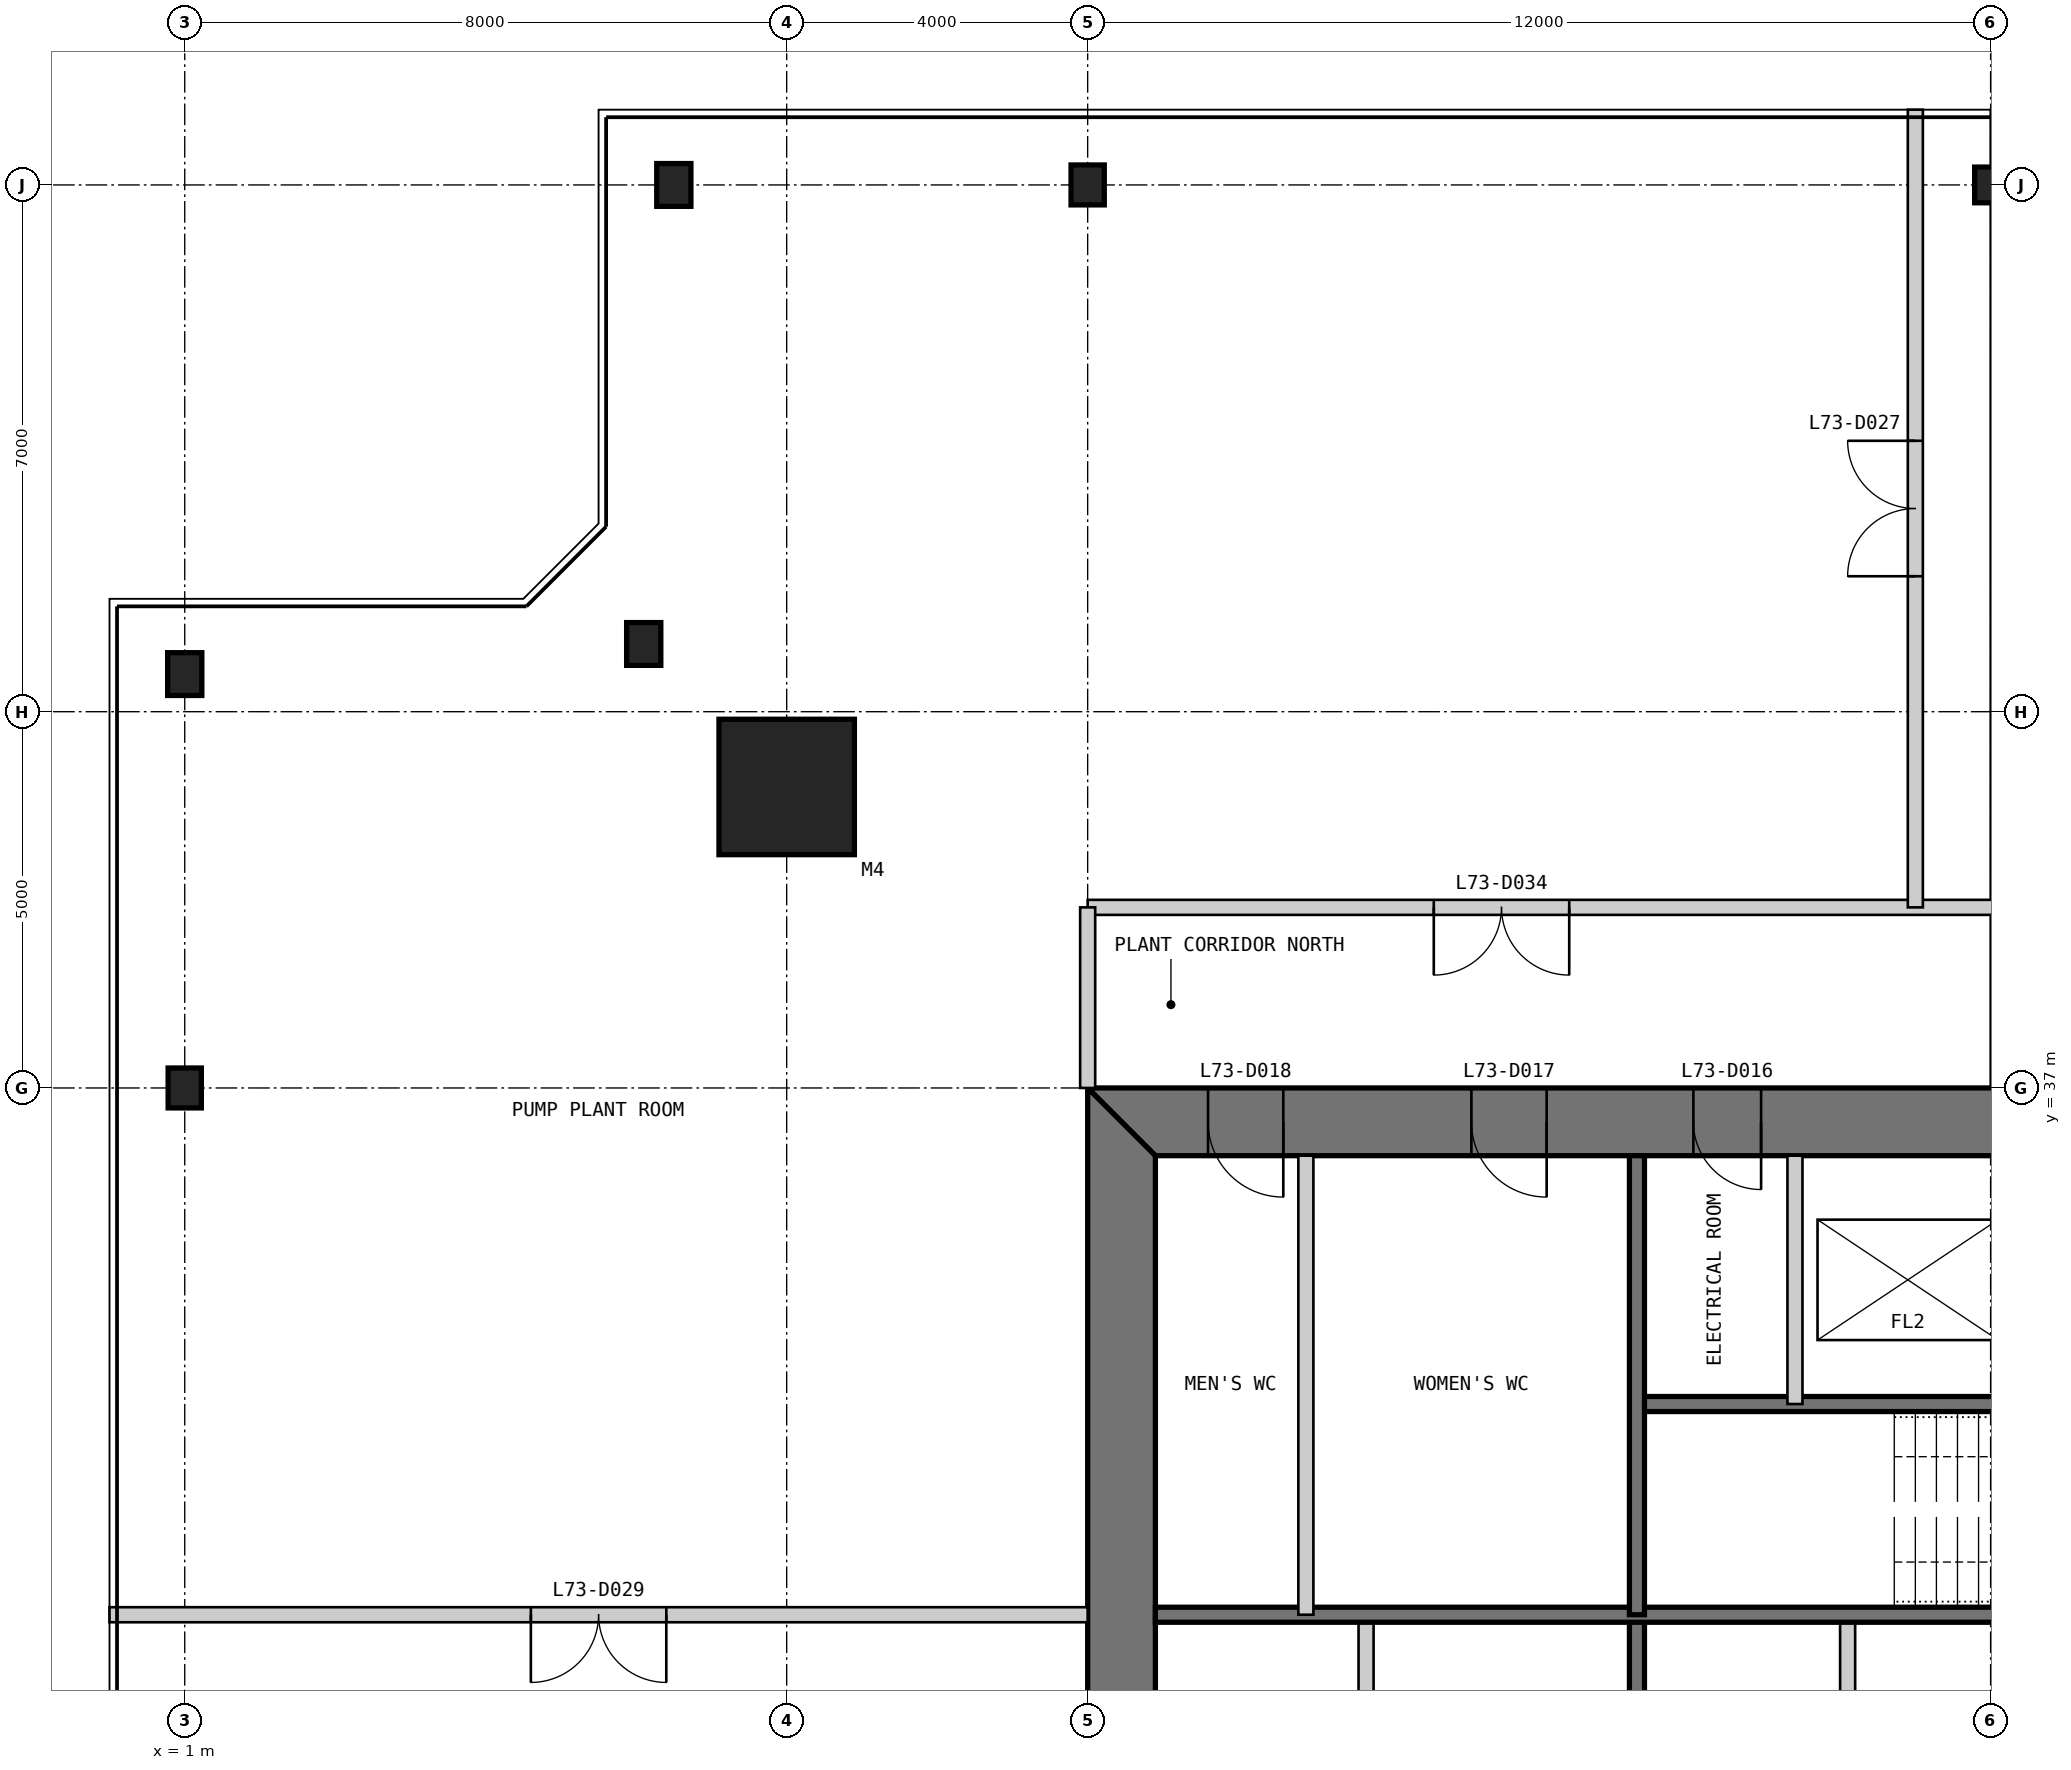
"""IFC4 building model, lengths in metres.
Left out: names, types, materials, properties, quantities, classifications, styles, units other than length and angle.
Written with IfcOpenShell. Run it as: python <this file> out.ifc"""

import sys

from ifc_helpers import new_model, si_unit, direction, frame, frame_2d, origin, origin_2d, place, context, subcontext, project, spatial, polyline, rectangle, i_section, outline, extrude, element, fill, save


model = new_model("IFC4")
c1 = context("Model", 3, precision=1e-05, world=origin(), true_north=direction((0.0, 1.0)))
c2 = subcontext(c1, "Body", "Model", "MODEL_VIEW")
j1 = project(units=[si_unit("LENGTHUNIT", "METRE"), si_unit("PLANEANGLEUNIT", "RADIAN")], contexts=[c1])
p1 = place(None, origin())
s1 = spatial("IfcSite", under=j1, at=p1, CompositionType="ELEMENT")
p2 = place(p1, origin())
s2 = spatial("IfcBuilding", under=s1, at=p2, CompositionType="ELEMENT")
p3 = place(p2, frame((0.0, 0.0, 301.8)))
s3 = spatial("IfcBuildingStorey", under=s2, at=p3, CompositionType="ELEMENT", Elevation=301.8)
p4 = place(p3, frame((9.0, 41.0, 0.0), z_axis=(0.0, 0.0, 1.0), x_axis=(1.0, 0.0, 0.0)))
e1 = element("IfcColumn", 1, at=p4, inside=s3, PredefinedType="COLUMN", context=c2, shape_type="SweptSolid", body=[
    extrude(rectangle(XDim=1.8, YDim=1.8, at=origin_2d()), origin(), (0.0, 0.0, 1.0), 6.0),
])
p5 = place(p3, frame((25.0, 49.0, 0.0), z_axis=(0.0, 0.0, 1.0), x_axis=(1.0, 0.0, 0.0)))
e2 = element("IfcColumn", 2, at=p5, inside=s3, PredefinedType="COLUMN", context=c2, shape_type="SweptSolid", body=[
    extrude(i_section(OverallWidth=0.424, OverallDepth=0.475, WebThickness=0.048, FlangeThickness=0.077, at=origin_2d()), origin(), (0.0, 0.0, 1.0), 6.0),
])
p6 = place(p3, frame((13.0, 49.0, 0.0), z_axis=(0.0, 0.0, 1.0), x_axis=(1.0, 0.0, 0.0)))
e3 = element("IfcColumn", 3, at=p6, inside=s3, PredefinedType="COLUMN", context=c2, shape_type="SweptSolid", body=[
    extrude(i_section(OverallWidth=0.442, OverallDepth=0.531, WebThickness=0.066, FlangeThickness=0.106, at=origin_2d()), origin(), (0.0, 0.0, 1.0), 6.0),
])
for number, where, z_axis, x_axis in (
    (4, (7.5, 49.0, 0.0), (0.0, 0.0, 1.0), (1.0, 0.0, 0.0)),
    (5, (7.1, 42.9, 0.0), (0.0, 0.0, 1.0), (1.0, 0.0, 0.0)),
    (6, (1.0, 42.5, 0.0), (0.0, 0.0, 1.0), (1.0, 0.0, 0.0)),
):
    element("IfcColumn", number, at=place(p3, frame(where, z_axis=z_axis, x_axis=x_axis)), inside=s3, PredefinedType="COLUMN", context=c2, shape_type="SweptSolid", body=[
        extrude(i_section(OverallWidth=0.455, OverallDepth=0.569, WebThickness=0.078, FlangeThickness=0.125, at=origin_2d()), origin(), (0.0, 0.0, 1.0), 6.0),
    ])
p7 = place(p3, frame((1.0, 37.0, 0.0), z_axis=(0.0, 0.0, 1.0), x_axis=(1.0, 0.0, 0.0)))
e7 = element("IfcColumn", 7, at=p7, inside=s3, PredefinedType="COLUMN", context=c2, shape_type="SweptSolid", body=[
    extrude(i_section(OverallWidth=0.442, OverallDepth=0.531, WebThickness=0.066, FlangeThickness=0.106, at=origin_2d()), origin(), (0.0, 0.0, 1.0), 6.0),
])
p8 = place(p3, frame((37.0, 36.55, 0.0), z_axis=(0.0, 0.0, 1.0), x_axis=(-1.0, 0.0, 0.0)))
e8 = element("IfcWall", 8, at=p8, inside=s3, PredefinedType="SHEAR", context=c2, shape_type="SweptSolid", body=[
    extrude(outline(polyline([(0.0, -0.45), (24.0, -0.45), (23.1, 0.45), (0.9, 0.45), (0.0, -0.45)])), origin(), (0.0, 0.0, 1.0), 6.0),
])
p9 = place(p8, frame((4.9, 0.0, 0.0)))
e9 = element("IfcOpeningElement", 9, at=p9, cuts=e8, PredefinedType="OPENING", context=c2, shape_type="SweptSolid", body=[
    extrude(rectangle(XDim=1.0, YDim=2.2, at=frame_2d((0.5, 1.1))), frame((0.0, 0.46, 0.0), z_axis=(0.0, -1.0, 0.0), x_axis=(1.0, 0.0, 0.0)), (0.0, 0.0, 1.0), 0.92),
])
p10 = place(p8, frame((8.9, 0.0, 0.0)))
e10 = element("IfcOpeningElement", 10, at=p10, cuts=e8, PredefinedType="OPENING", context=c2, shape_type="SweptSolid", body=[
    extrude(rectangle(XDim=1.1, YDim=2.2, at=frame_2d((0.55, 1.1))), frame((0.0, 0.46, 0.0), z_axis=(0.0, -1.0, 0.0), x_axis=(1.0, 0.0, 0.0)), (0.0, 0.0, 1.0), 0.92),
])
p11 = place(p8, frame((15.05, 0.0, 0.0)))
e11 = element("IfcOpeningElement", 11, at=p11, cuts=e8, PredefinedType="OPENING", context=c2, shape_type="SweptSolid", body=[
    extrude(rectangle(XDim=0.9, YDim=2.2, at=frame_2d((0.45, 1.1))), frame((0.0, 0.46, 0.0), z_axis=(0.0, -1.0, 0.0), x_axis=(1.0, 0.0, 0.0)), (0.0, 0.0, 1.0), 0.92),
])
p12 = place(p8, frame((17.9, 0.0, 0.0)))
e12 = element("IfcOpeningElement", 12, at=p12, cuts=e8, PredefinedType="OPENING", context=c2, shape_type="SweptSolid", body=[
    extrude(rectangle(XDim=1.0, YDim=2.2, at=frame_2d((0.5, 1.1))), frame((0.0, 0.46, 0.0), z_axis=(0.0, -1.0, 0.0), x_axis=(1.0, 0.0, 0.0)), (0.0, 0.0, 1.0), 0.92),
])
p13 = place(p8, frame((21.4, 0.0, 0.0)))
e13 = element("IfcOpeningElement", 13, at=p13, cuts=e8, PredefinedType="OPENING", context=c2, shape_type="SweptSolid", body=[
    extrude(rectangle(XDim=1.0, YDim=2.2, at=frame_2d((0.5, 1.1))), frame((0.0, 0.46, 0.0), z_axis=(0.0, -1.0, 0.0), x_axis=(1.0, 0.0, 0.0)), (0.0, 0.0, 1.0), 0.92),
])
p14 = place(p3, frame((13.45, 36.1, 0.0), z_axis=(0.0, 0.0, 1.0), x_axis=(0.0, -1.0, 0.0)))
e14 = element("IfcWall", 14, at=p14, inside=s3, PredefinedType="SHEAR", context=c2, shape_type="SweptSolid", body=[
    extrude(outline(polyline([(-0.9, -0.45), (23.1, -0.45), (22.2, 0.45), (0.0, 0.45), (-0.9, -0.45)])), origin(), (0.0, 0.0, 1.0), 6.0),
])
p15 = place(p14, frame((20.2, 0.0, 0.0)))
e15 = element("IfcOpeningElement", 15, at=p15, cuts=e14, PredefinedType="OPENING", context=c2, shape_type="SweptSolid", body=[
    extrude(rectangle(XDim=1.0, YDim=2.2, at=frame_2d((0.5, 1.1))), frame((0.0, 0.46, 0.0), z_axis=(0.0, -1.0, 0.0), x_axis=(1.0, 0.0, 0.0)), (0.0, 0.0, 1.0), 0.92),
])
p16 = place(p14, frame((17.25, 0.0, 0.0)))
e16 = element("IfcOpeningElement", 16, at=p16, cuts=e14, PredefinedType="OPENING", context=c2, shape_type="SweptSolid", body=[
    extrude(rectangle(XDim=0.9, YDim=2.2, at=frame_2d((0.45, 1.1))), frame((0.0, 0.46, 0.0), z_axis=(0.0, -1.0, 0.0), x_axis=(1.0, 0.0, 0.0)), (0.0, 0.0, 1.0), 0.92),
])
p17 = place(p3, frame((16.7, 13.9, 0.0), z_axis=(0.0, 0.0, 1.0), x_axis=(0.0, 1.0, 0.0)))
e17 = element("IfcWall", 17, at=p17, inside=s3, PredefinedType="PARTITIONING", context=c2, shape_type="SweptSolid", body=[
    extrude(rectangle(XDim=16.1, YDim=0.2, at=frame_2d((8.05, 0.0))), origin(), (0.0, 0.0, 1.0), 5.8),
])
p18 = place(p17, frame((9.65, 0.0, 0.0)))
e18 = element("IfcOpeningElement", 18, at=p18, cuts=e17, PredefinedType="OPENING", context=c2, shape_type="SweptSolid", body=[
    extrude(rectangle(XDim=0.9, YDim=2.2, at=frame_2d((0.45, 1.1))), frame((0.0, 0.11, 0.0), z_axis=(0.0, -1.0, 0.0), x_axis=(1.0, 0.0, 0.0)), (0.0, 0.0, 1.0), 0.22),
])
p19 = place(p17, frame((13.65, 0.0, 0.0)))
e19 = element("IfcOpeningElement", 19, at=p19, cuts=e17, PredefinedType="OPENING", context=c2, shape_type="SweptSolid", body=[
    extrude(rectangle(XDim=0.9, YDim=2.2, at=frame_2d((0.45, 1.1))), frame((0.0, 0.11, 0.0), z_axis=(0.0, -1.0, 0.0), x_axis=(1.0, 0.0, 0.0)), (0.0, 0.0, 1.0), 0.22),
])
p20 = place(p3, frame((20.3, 13.9, 0.0), z_axis=(0.0, 0.0, 1.0), x_axis=(0.0, 1.0, 0.0)))
e20 = element("IfcWall", 20, at=p20, inside=s3, PredefinedType="SOLIDWALL", context=c2, shape_type="SweptSolid", body=[
    extrude(rectangle(XDim=16.1, YDim=0.2, at=frame_2d((8.05, 0.0))), origin(), (0.0, 0.0, 1.0), 5.8),
])
p21 = place(p20, frame((8.4, 0.0, 0.0)))
e21 = element("IfcOpeningElement", 21, at=p21, cuts=e20, PredefinedType="OPENING", context=c2, shape_type="SweptSolid", body=[
    extrude(rectangle(XDim=0.9, YDim=2.2, at=frame_2d((0.45, 1.1))), frame((0.0, 0.11, 0.0), z_axis=(0.0, -1.0, 0.0), x_axis=(1.0, 0.0, 0.0)), (0.0, 0.0, 1.0), 0.22),
])
p22 = place(p20, frame((13.4, 0.0, 0.0)))
e22 = element("IfcOpeningElement", 22, at=p22, cuts=e20, PredefinedType="OPENING", context=c2, shape_type="SweptSolid", body=[
    extrude(rectangle(XDim=0.9, YDim=2.2, at=frame_2d((0.45, 1.1))), frame((0.0, 0.11, 0.0), z_axis=(0.0, -1.0, 0.0), x_axis=(1.0, 0.0, 0.0)), (0.0, 0.0, 1.0), 0.22),
])
p23 = place(p3, frame((23.1, 20.0, 0.0), z_axis=(0.0, 0.0, 1.0), x_axis=(0.0, 1.0, 0.0)))
e23 = element("IfcWall", 23, at=p23, inside=s3, PredefinedType="PARTITIONING", context=c2, shape_type="SweptSolid", body=[
    extrude(rectangle(XDim=10.0, YDim=0.2, at=frame_2d((5.0, 0.0))), origin(), (0.0, 0.0, 1.0), 5.8),
])
p24 = place(p3, frame((29.7, 32.8, 0.0), z_axis=(0.0, 0.0, 1.0), x_axis=(-1.0, 0.0, 0.0)))
e24 = element("IfcWall", 24, at=p24, inside=s3, PredefinedType="SOLIDWALL", context=c2, shape_type="SweptSolid", body=[
    extrude(rectangle(XDim=9.4, YDim=0.2, at=frame_2d((4.7, 0.0))), origin(), (0.0, 0.0, 1.0), 5.8),
])
p25 = place(p24, frame((0.25, 0.0, 0.0)))
e25 = element("IfcOpeningElement", 25, at=p25, cuts=e24, PredefinedType="OPENING", context=c2, shape_type="SweptSolid", body=[
    extrude(rectangle(XDim=1.0, YDim=2.2, at=frame_2d((0.5, 1.1))), frame((0.0, 0.11, 0.0), z_axis=(0.0, -1.0, 0.0), x_axis=(1.0, 0.0, 0.0)), (0.0, 0.0, 1.0), 0.22),
])
p26 = place(p3, frame((29.7, 30.0, 0.0), z_axis=(0.0, 0.0, 1.0), x_axis=(-1.0, 0.0, 0.0)))
e26 = element("IfcWall", 26, at=p26, inside=s3, PredefinedType="SOLIDWALL", context=c2, shape_type="SweptSolid", body=[
    extrude(rectangle(XDim=15.8, YDim=0.2, at=frame_2d((7.9, 0.0))), origin(), (0.0, 0.0, 1.0), 5.8),
])
p27 = place(p3, frame((22.4, 36.1, 0.0), z_axis=(0.0, 0.0, 1.0), x_axis=(0.0, -1.0, 0.0)))
e27 = element("IfcWall", 27, at=p27, inside=s3, PredefinedType="PARTITIONING", context=c2, shape_type="SweptSolid", body=[
    extrude(rectangle(XDim=3.3, YDim=0.2, at=frame_2d((1.65, 0.0))), origin(), (0.0, 0.0, 1.0), 5.8),
])
p28 = place(p3, frame((20.3, 36.1, 0.0), z_axis=(0.0, 0.0, 1.0), x_axis=(0.0, -1.0, 0.0)))
e28 = element("IfcWall", 28, at=p28, inside=s3, PredefinedType="SOLIDWALL", context=c2, shape_type="SweptSolid", body=[
    extrude(rectangle(XDim=6.1, YDim=0.2, at=frame_2d((3.05, 0.0))), origin(), (0.0, 0.0, 1.0), 5.8),
])
p29 = place(p3, frame((15.9, 36.1, 0.0), z_axis=(0.0, 0.0, 1.0), x_axis=(0.0, -1.0, 0.0)))
e29 = element("IfcWall", 29, at=p29, inside=s3, PredefinedType="PARTITIONING", context=c2, shape_type="SweptSolid", body=[
    extrude(rectangle(XDim=6.1, YDim=0.2, at=frame_2d((3.05, 0.0))), origin(), (0.0, 0.0, 1.0), 5.8),
])
p30 = place(p3, frame((13.0, 39.4, 0.0), z_axis=(0.0, 0.0, 1.0), x_axis=(1.0, 0.0, 0.0)))
e30 = element("IfcWall", 30, at=p30, inside=s3, PredefinedType="PARTITIONING", context=c2, shape_type="SweptSolid", body=[
    extrude(rectangle(XDim=24.0, YDim=0.2, at=frame_2d((12.0, 0.0))), origin(), (0.0, 0.0, 1.0), 5.8),
])
p31 = place(p30, frame((16.6, 0.0, 0.0)))
e31 = element("IfcOpeningElement", 31, at=p31, cuts=e30, PredefinedType="OPENING", context=c2, shape_type="SweptSolid", body=[
    extrude(rectangle(XDim=1.8, YDim=2.4, at=frame_2d((0.9, 1.2))), frame((0.0, 0.11, 0.0), z_axis=(0.0, -1.0, 0.0), x_axis=(1.0, 0.0, 0.0)), (0.0, 0.0, 1.0), 0.22),
])
p32 = place(p30, frame((4.6, 0.0, 0.0)))
e32 = element("IfcOpeningElement", 32, at=p32, cuts=e30, PredefinedType="OPENING", context=c2, shape_type="SweptSolid", body=[
    extrude(rectangle(XDim=1.8, YDim=2.4, at=frame_2d((0.9, 1.2))), frame((0.0, 0.11, 0.0), z_axis=(0.0, -1.0, 0.0), x_axis=(1.0, 0.0, 0.0)), (0.0, 0.0, 1.0), 0.22),
])
p33 = place(p3, frame((13.0, 37.0, 0.0), z_axis=(0.0, 0.0, 1.0), x_axis=(0.0, 1.0, 0.0)))
e33 = element("IfcWall", 33, at=p33, inside=s3, PredefinedType="PARTITIONING", context=c2, shape_type="SweptSolid", body=[
    extrude(rectangle(XDim=2.4, YDim=0.2, at=frame_2d((1.2, 0.0))), origin(), (0.0, 0.0, 1.0), 4.853),
])
p34 = place(p3, frame((24.0, 39.4, 0.0), z_axis=(0.0, 0.0, 1.0), x_axis=(0.0, 1.0, 0.0)))
e34 = element("IfcWall", 34, at=p34, inside=s3, PredefinedType="PARTITIONING", context=c2, shape_type="SweptSolid", body=[
    extrude(rectangle(XDim=10.6, YDim=0.2, at=frame_2d((5.3, 0.0))), origin(), (0.0, 0.0, 1.0), 5.8),
])
p35 = place(p34, frame((4.4, 0.0, 0.0)))
e35 = element("IfcOpeningElement", 35, at=p35, cuts=e34, PredefinedType="OPENING", context=c2, shape_type="SweptSolid", body=[
    extrude(rectangle(XDim=1.8, YDim=2.4, at=frame_2d((0.9, 1.2))), frame((0.0, 0.11, 0.0), z_axis=(0.0, -1.0, 0.0), x_axis=(1.0, 0.0, 0.0)), (0.0, 0.0, 1.0), 0.22),
])
p36 = place(p3, frame((0.0, 30.0, 0.0), z_axis=(0.0, 0.0, 1.0), x_axis=(1.0, 0.0, 0.0)))
e36 = element("IfcWall", 36, at=p36, inside=s3, PredefinedType="PARTITIONING", context=c2, shape_type="SweptSolid", body=[
    extrude(rectangle(XDim=13.0, YDim=0.2, at=frame_2d((6.5, 0.0))), origin(), (0.0, 0.0, 1.0), 5.8),
])
p37 = place(p36, frame((5.6, 0.0, 0.0)))
e37 = element("IfcOpeningElement", 37, at=p37, cuts=e36, PredefinedType="OPENING", context=c2, shape_type="SweptSolid", body=[
    extrude(rectangle(XDim=1.8, YDim=2.4, at=frame_2d((0.9, 1.2))), frame((0.0, 0.11, 0.0), z_axis=(0.0, -1.0, 0.0), x_axis=(1.0, 0.0, 0.0)), (0.0, 0.0, 1.0), 0.22),
])
p38 = place(p11, origin())
e38 = element("IfcDoor", 38, at=p38, inside=s3, OperationType="SINGLE_SWING_LEFT", PredefinedType="DOOR", context=c2, shape_type="SweptSolid", body=[
    extrude(rectangle(XDim=0.9, YDim=2.2, at=frame_2d((0.45, 1.1))), frame((0.0, 0.025, 0.0), z_axis=(0.0, -1.0, 0.0), x_axis=(1.0, 0.0, 0.0)), (0.0, 0.0, 1.0), 0.05),
    extrude(outline(polyline([(0.0, 0.0), (0.04, 0.0), (0.04, 2.16), (0.86, 2.16), (0.86, 0.0), (0.9, 0.0), (0.9, 2.2), (0.0, 2.2), (0.0, 0.0)])), frame((0.0, 0.3, 0.0), z_axis=(0.0, -1.0, 0.0), x_axis=(1.0, 0.0, 0.0)), (0.0, 0.0, 1.0), 0.6),
])
fill(e11, e38)
p39 = place(p12, origin())
e39 = element("IfcDoor", 39, at=p39, inside=s3, OperationType="SINGLE_SWING_LEFT", PredefinedType="DOOR", context=c2, shape_type="SweptSolid", body=[
    extrude(rectangle(XDim=1.0, YDim=2.2, at=frame_2d((0.5, 1.1))), frame((0.0, 0.025, 0.0), z_axis=(0.0, -1.0, 0.0), x_axis=(1.0, 0.0, 0.0)), (0.0, 0.0, 1.0), 0.05),
    extrude(outline(polyline([(0.0, 0.0), (0.04, 0.0), (0.04, 2.16), (0.96, 2.16), (0.96, 0.0), (1.0, 0.0), (1.0, 2.2), (0.0, 2.2), (0.0, 0.0)])), frame((0.0, 0.3, 0.0), z_axis=(0.0, -1.0, 0.0), x_axis=(1.0, 0.0, 0.0)), (0.0, 0.0, 1.0), 0.6),
])
fill(e12, e39)
p40 = place(p13, origin())
e40 = element("IfcDoor", 40, at=p40, inside=s3, OperationType="SINGLE_SWING_LEFT", PredefinedType="DOOR", context=c2, shape_type="SweptSolid", body=[
    extrude(rectangle(XDim=1.0, YDim=2.2, at=frame_2d((0.5, 1.1))), frame((0.0, 0.025, 0.0), z_axis=(0.0, -1.0, 0.0), x_axis=(1.0, 0.0, 0.0)), (0.0, 0.0, 1.0), 0.05),
    extrude(outline(polyline([(0.0, 0.0), (0.04, 0.0), (0.04, 2.16), (0.96, 2.16), (0.96, 0.0), (1.0, 0.0), (1.0, 2.2), (0.0, 2.2), (0.0, 0.0)])), frame((0.0, 0.3, 0.0), z_axis=(0.0, -1.0, 0.0), x_axis=(1.0, 0.0, 0.0)), (0.0, 0.0, 1.0), 0.6),
])
fill(e13, e40)
p41 = place(p35, origin())
e41 = element("IfcDoor", 41, at=p41, inside=s3, OperationType="DOUBLE_DOOR_SINGLE_SWING", PredefinedType="DOOR", context=c2, shape_type="SweptSolid", body=[
    extrude(rectangle(XDim=1.8, YDim=2.4, at=frame_2d((0.9, 1.2))), frame((0.0, 0.025, 0.0), z_axis=(0.0, -1.0, 0.0), x_axis=(1.0, 0.0, 0.0)), (0.0, 0.0, 1.0), 0.05),
])
fill(e35, e41)
p42 = place(p37, frame((1.8, 0.0, 0.0), z_axis=(0.0, 0.0, 1.0), x_axis=(-1.0, 0.0, 0.0)))
e42 = element("IfcDoor", 42, at=p42, inside=s3, OperationType="DOUBLE_DOOR_SINGLE_SWING", PredefinedType="DOOR", context=c2, shape_type="SweptSolid", body=[
    extrude(rectangle(XDim=1.8, YDim=2.4, at=frame_2d((0.9, 1.2))), frame((0.0, 0.025, 0.0), z_axis=(0.0, -1.0, 0.0), x_axis=(1.0, 0.0, 0.0)), (0.0, 0.0, 1.0), 0.05),
])
fill(e37, e42)
p43 = place(p32, frame((1.8, 0.0, 0.0), z_axis=(0.0, 0.0, 1.0), x_axis=(-1.0, 0.0, 0.0)))
e43 = element("IfcDoor", 43, at=p43, inside=s3, OperationType="DOUBLE_DOOR_SINGLE_SWING", PredefinedType="DOOR", context=c2, shape_type="SweptSolid", body=[
    extrude(rectangle(XDim=1.8, YDim=2.4, at=frame_2d((0.9, 1.2))), frame((0.0, 0.025, 0.0), z_axis=(0.0, -1.0, 0.0), x_axis=(1.0, 0.0, 0.0)), (0.0, 0.0, 1.0), 0.05),
])
fill(e32, e43)
save(model, sys.argv[1])
